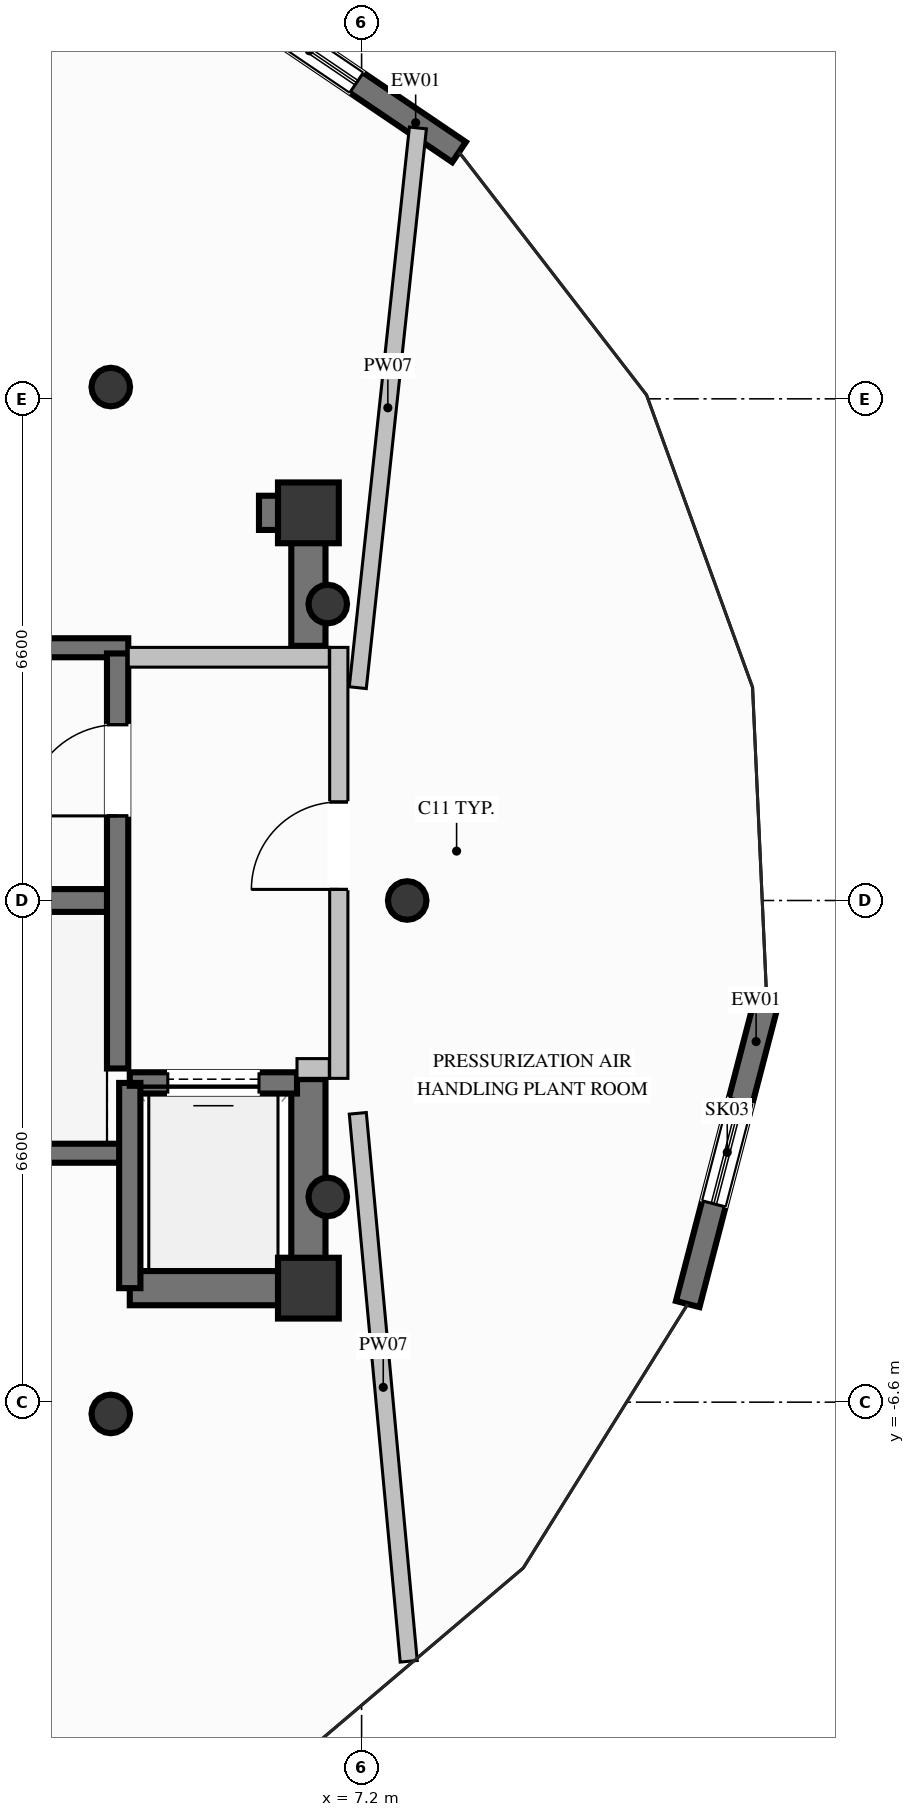
"""IFC4 building model, lengths in metres.
Left out: names, types, materials, properties, quantities, classifications, styles, units other than length and angle.
Written with IfcOpenShell. Run it as: python <this file> out.ifc"""

import sys

from ifc_helpers import new_model, si_unit, direction, frame, frame_2d, origin, origin_2d, place, context, subcontext, project, spatial, rectangle, hollow_circle, extrude, element, fill, save


model = new_model("IFC4")
c1 = context("Model", 3, precision=1e-05, world=origin(), true_north=direction((0.0, 1.0)))
c2 = subcontext(c1, "Body", "Model", "MODEL_VIEW")
j1 = project(units=[si_unit("LENGTHUNIT", "METRE"), si_unit("PLANEANGLEUNIT", "RADIAN")], contexts=[c1])
p1 = place(None, origin())
s1 = spatial("IfcSite", under=j1, at=p1, CompositionType="ELEMENT")
p2 = place(p1, origin())
s2 = spatial("IfcBuilding", under=s1, at=p2, CompositionType="ELEMENT")
p3 = place(p2, frame((0.0, 0.0, 308.2)))
s3 = spatial("IfcBuildingStorey", under=s2, at=p3, CompositionType="ELEMENT", Elevation=308.2)
for number, where, z_axis, x_axis in (
    (1, (6.5, -5.1, 0.0), (0.0, 0.0, 1.0), (1.0, 0.0, 0.0)),
    (2, (6.5, 5.1, 0.0), (0.0, 0.0, 1.0), (1.0, 0.0, 0.0)),
):
    element("IfcColumn", number, at=place(p3, frame(where, z_axis=z_axis, x_axis=x_axis)), inside=s3, PredefinedType="COLUMN", context=c2, shape_type="SweptSolid", body=[
        extrude(rectangle(XDim=0.8, YDim=0.8, at=origin_2d()), origin(), (0.0, 0.0, 1.0), 6.4),
    ])
p4 = place(p3, frame((-3.99, 0.0, 0.0), z_axis=(0.0, 0.0, 1.0), x_axis=(1.0, 0.0, 0.0)))
e3 = element("IfcWall", 3, at=p4, inside=s3, PredefinedType="SHEAR", context=c2, shape_type="SweptSolid", body=[
    extrude(rectangle(XDim=7.98, YDim=0.3, at=frame_2d((3.99, 0.0))), origin(), (0.0, 0.0, 1.0), 6.4),
])
for number, where, z_axis, x_axis in (
    (4, (-4.13, -3.325, 0.0), (0.0, 0.0, 1.0), (1.0, 0.0, 0.0)),
    (5, (-4.13, 3.325, 0.0), (0.0, 0.0, 1.0), (1.0, 0.0, 0.0)),
):
    element("IfcWall", number, at=place(p3, frame(where, z_axis=z_axis, x_axis=x_axis)), inside=s3, PredefinedType="SOLIDWALL", context=c2, shape_type="SweptSolid", body=[
        extrude(rectangle(XDim=8.26, YDim=0.25, at=frame_2d((4.13, 0.0))), origin(), (0.0, 0.0, 1.0), 6.4),
    ])
p5 = place(p3, frame((4.15, -5.1, 0.0), z_axis=(0.0, 0.0, 1.0), x_axis=(1.0, 0.0, 0.0)))
e6 = element("IfcWall", 6, at=p5, inside=s3, PredefinedType="SHEAR", context=c2, shape_type="SweptSolid", body=[
    extrude(rectangle(XDim=2.125, YDim=0.45, at=frame_2d((1.062, 0.0))), origin(), (0.0, 0.0, 1.0), 6.4),
])
p6 = place(p3, frame((5.85, 5.1, 0.0), z_axis=(0.0, 0.0, 1.0), x_axis=(1.0, 0.0, 0.0)))
e7 = element("IfcWall", 7, at=p6, inside=s3, PredefinedType="SHEAR", context=c2, shape_type="SweptSolid", body=[
    extrude(rectangle(XDim=0.425, YDim=0.45, at=frame_2d((0.212, 0.0))), origin(), (0.0, 0.0, 1.0), 6.4),
])
p7 = place(p3, frame((6.5, -5.325, 0.0), z_axis=(0.0, 0.0, 1.0), x_axis=(0.0, 1.0, 0.0)))
e8 = element("IfcWall", 8, at=p7, inside=s3, PredefinedType="SHEAR", context=c2, shape_type="SweptSolid", body=[
    extrude(rectangle(XDim=2.975, YDim=0.45, at=frame_2d((1.487, 0.0))), origin(), (0.0, 0.0, 1.0), 6.4),
])
p8 = place(p3, frame((6.5, 3.35, 0.0), z_axis=(0.0, 0.0, 1.0), x_axis=(0.0, 1.0, 0.0)))
e9 = element("IfcWall", 9, at=p8, inside=s3, PredefinedType="SHEAR", context=c2, shape_type="SweptSolid", body=[
    extrude(rectangle(XDim=1.975, YDim=0.45, at=frame_2d((0.987, 0.0))), origin(), (0.0, 0.0, 1.0), 6.4),
])
for number, where, z_axis, x_axis in (
    (10, (7.8, 0.0, 0.0), (0.0, 0.0, 1.0), (1.0, 0.0, 0.0)),
    (11, (6.755, 3.9, 0.0), (0.0, 0.0, 1.0), (1.0, 0.0, 0.0)),
    (12, (3.9, 6.755, 0.0), (0.0, 0.0, 1.0), (1.0, 0.0, 0.0)),
    (13, (3.9, -6.755, 0.0), (0.0, 0.0, 1.0), (1.0, 0.0, 0.0)),
    (14, (6.755, -3.9, 0.0), (0.0, 0.0, 1.0), (1.0, 0.0, 0.0)),
):
    element("IfcColumn", number, at=place(p3, frame(where, z_axis=z_axis, x_axis=x_axis)), inside=s3, PredefinedType="COLUMN", context=c2, shape_type="SweptSolid", body=[
        extrude(hollow_circle(Radius=0.254, WallThickness=0.02, at=origin_2d()), origin(), (0.0, 0.0, 1.0), 6.4),
    ])
p9 = place(p3, frame((12.531, -1.317, 0.0), z_axis=(0.0, 0.0, 1.0), x_axis=(-0.252103886341, -0.967700175928, 0.0)))
e15 = element("IfcWall", 15, at=p9, inside=s3, PredefinedType="SOLIDWALL", context=c2, shape_type="SweptSolid", body=[
    extrude(rectangle(XDim=4.125, YDim=0.32, at=frame_2d((2.063, 0.0))), origin(), (0.0, 0.0, 1.0), 6.12),
])
p10 = place(p9, frame((1.363, 0.0, 0.6)))
e16 = element("IfcOpeningElement", 16, at=p10, cuts=e15, PredefinedType="OPENING", context=c2, shape_type="SweptSolid", body=[
    extrude(rectangle(XDim=1.4, YDim=1.8, at=frame_2d((0.7, 0.9))), frame((0.0, 0.17, 0.0), z_axis=(0.0, -1.0, 0.0), x_axis=(1.0, 0.0, 0.0)), (0.0, 0.0, 1.0), 0.34),
])
p11 = place(p3, frame((5.185, 12.078, 0.0), z_axis=(0.0, 0.0, 1.0), x_axis=(0.828085822651, -0.560601347059, 0.0)))
e17 = element("IfcWall", 17, at=p11, inside=s3, PredefinedType="SOLIDWALL", context=c2, shape_type="SweptSolid", body=[
    extrude(rectangle(XDim=3.981, YDim=0.32, at=frame_2d((1.991, 0.0))), origin(), (0.0, 0.0, 1.0), 6.12),
])
p12 = place(p11, frame((0.853, 0.0, 1.1)))
e18 = element("IfcOpeningElement", 18, at=p12, cuts=e17, PredefinedType="OPENING", context=c2, shape_type="SweptSolid", body=[
    extrude(rectangle(XDim=1.5, YDim=1.2, at=frame_2d((0.75, 0.6))), frame((0.0, 0.17, 0.0), z_axis=(0.0, -1.0, 0.0), x_axis=(1.0, 0.0, 0.0)), (0.0, 0.0, 1.0), 0.34),
])
p13 = place(p3, frame((6.35, -2.4, 0.0), z_axis=(0.0, 0.0, 1.0), x_axis=(-1.0, 0.0, 0.0)))
e19 = element("IfcWall", 19, at=p13, inside=s3, PredefinedType="SOLIDWALL", context=c2, shape_type="SweptSolid", body=[
    extrude(rectangle(XDim=2.2, YDim=0.28, at=frame_2d((1.1, 0.0))), origin(), (0.0, 0.0, 1.0), 6.12),
])
p14 = place(p13, frame((0.5, 0.0, 0.0)))
e20 = element("IfcOpeningElement", 20, at=p14, cuts=e19, PredefinedType="OPENING", context=c2, shape_type="SweptSolid", body=[
    extrude(rectangle(XDim=1.2, YDim=2.2, at=frame_2d((0.6, 1.1))), frame((0.0, 0.15, 0.0), z_axis=(0.0, -1.0, 0.0), x_axis=(1.0, 0.0, 0.0)), (0.0, 0.0, 1.0), 0.3),
])
p15 = place(p3, frame((4.15, -2.4, 0.0), z_axis=(0.0, 0.0, 1.0), x_axis=(0.0, -1.0, 0.0)))
e21 = element("IfcWall", 21, at=p15, inside=s3, PredefinedType="SOLIDWALL", context=c2, shape_type="SweptSolid", body=[
    extrude(rectangle(XDim=2.7, YDim=0.28, at=frame_2d((1.35, 0.0))), origin(), (0.0, 0.0, 1.0), 6.12),
])
p16 = place(p3, frame((3.99, -2.21, 0.0), z_axis=(0.0, 0.0, 1.0), x_axis=(0.0, 1.0, 0.0)))
e22 = element("IfcWall", 22, at=p16, inside=s3, PredefinedType="SOLIDWALL", context=c2, shape_type="SweptSolid", body=[
    extrude(rectangle(XDim=5.46, YDim=0.28, at=frame_2d((2.73, 0.0))), origin(), (0.0, 0.0, 1.0), 6.12),
])
p17 = place(p16, frame((3.323, 0.0, 0.0)))
e23 = element("IfcOpeningElement", 23, at=p17, cuts=e22, PredefinedType="OPENING", context=c2, shape_type="SweptSolid", body=[
    extrude(rectangle(XDim=1.2, YDim=2.2, at=frame_2d((0.6, 1.1))), frame((0.0, 0.15, 0.0), z_axis=(0.0, -1.0, 0.0), x_axis=(1.0, 0.0, 0.0)), (0.0, 0.0, 1.0), 0.3),
])
p18 = place(p3, frame((6.9, -2.34, 0.0), z_axis=(0.0, 0.0, 1.0), x_axis=(0.0, 1.0, 0.0)))
e24 = element("IfcWall", 24, at=p18, inside=s3, PredefinedType="PARTITIONING", context=c2, shape_type="SweptSolid", body=[
    extrude(rectangle(XDim=5.67, YDim=0.24, at=frame_2d((2.835, 0.0))), origin(), (0.0, 0.0, 1.0), 5.005),
])
p19 = place(p18, frame((2.486, 0.0, 0.0)))
e25 = element("IfcOpeningElement", 25, at=p19, cuts=e24, PredefinedType="OPENING", context=c2, shape_type="SweptSolid", body=[
    extrude(rectangle(XDim=1.15, YDim=2.2, at=frame_2d((0.575, 1.1))), frame((0.0, 0.13, 0.0), z_axis=(0.0, -1.0, 0.0), x_axis=(1.0, 0.0, 0.0)), (0.0, 0.0, 1.0), 0.26),
])
p20 = place(p3, frame((6.35, -2.21, 0.0), z_axis=(0.0, 0.0, 1.0), x_axis=(1.0, 0.0, 0.0)))
e26 = element("IfcWall", 26, at=p20, inside=s3, PredefinedType="PARTITIONING", context=c2, shape_type="SweptSolid", body=[
    extrude(rectangle(XDim=0.425, YDim=0.26, at=frame_2d((0.212, 0.0))), origin(), (0.0, 0.0, 1.0), 6.12),
])
p21 = place(p3, frame((4.13, 3.2, 0.0), z_axis=(0.0, 0.0, 1.0), x_axis=(1.0, 0.0, 0.0)))
e27 = element("IfcWall", 27, at=p21, inside=s3, PredefinedType="PARTITIONING", context=c2, shape_type="SweptSolid", body=[
    extrude(rectangle(XDim=2.645, YDim=0.26, at=frame_2d((1.323, 0.0))), origin(), (0.0, 0.0, 1.0), 6.12),
])
p22 = place(p3, frame((7.15, 2.8, 0.0), z_axis=(0.0, 0.0, 1.0), x_axis=(0.106801982795, 0.994280310813, 0.0)))
e28 = element("IfcWall", 28, at=p22, inside=s3, PredefinedType="PARTITIONING", context=c2, shape_type="SweptSolid", body=[
    extrude(rectangle(XDim=7.406, YDim=0.225, at=frame_2d((3.703, 0.0))), origin(), (0.0, 0.0, 1.0), 5.005),
])
p23 = place(p3, frame((7.15, -2.8, 0.0), z_axis=(0.0, 0.0, 1.0), x_axis=(0.092563503102, -0.995706783091, 0.0)))
e29 = element("IfcWall", 29, at=p23, inside=s3, PredefinedType="PARTITIONING", context=c2, shape_type="SweptSolid", body=[
    extrude(rectangle(XDim=7.24, YDim=0.225, at=frame_2d((3.62, 0.0))), origin(), (0.0, 0.0, 1.0), 5.005),
])
p24 = place(p10, origin())
e30 = element("IfcWindow", 30, at=p24, inside=s3, PartitioningType="SINGLE_PANEL", PredefinedType="SKYLIGHT", context=c2, shape_type="SweptSolid", body=[
    extrude(rectangle(XDim=1.4, YDim=1.8, at=frame_2d((0.7, 0.9))), frame((0.0, 0.03, 0.0), z_axis=(0.0, -1.0, 0.0), x_axis=(1.0, 0.0, 0.0)), (0.0, 0.0, 1.0), 0.06),
])
fill(e16, e30)
p25 = place(p12, origin())
e31 = element("IfcWindow", 31, at=p25, inside=s3, PartitioningType="SINGLE_PANEL", PredefinedType="WINDOW", context=c2, shape_type="SweptSolid", body=[
    extrude(rectangle(XDim=1.5, YDim=1.2, at=frame_2d((0.75, 0.6))), frame((0.0, 0.03, 0.0), z_axis=(0.0, -1.0, 0.0), x_axis=(1.0, 0.0, 0.0)), (0.0, 0.0, 1.0), 0.06),
])
fill(e18, e31)
p26 = place(p14, origin())
e32 = element("IfcDoor", 32, at=p26, inside=s3, OperationType="SLIDING_TO_LEFT", PredefinedType="DOOR", context=c2, shape_type="SweptSolid", body=[
    extrude(rectangle(XDim=1.2, YDim=2.2, at=frame_2d((0.6, 1.1))), frame((0.0, 0.025, 0.0), z_axis=(0.0, -1.0, 0.0), x_axis=(1.0, 0.0, 0.0)), (0.0, 0.0, 1.0), 0.05),
])
fill(e20, e32)
p27 = place(p17, origin())
e33 = element("IfcDoor", 33, at=p27, inside=s3, OperationType="SINGLE_SWING_LEFT", PredefinedType="DOOR", context=c2, shape_type="SweptSolid", body=[
    extrude(rectangle(XDim=1.2, YDim=2.2, at=frame_2d((0.6, 1.1))), frame((0.0, 0.025, 0.0), z_axis=(0.0, -1.0, 0.0), x_axis=(1.0, 0.0, 0.0)), (0.0, 0.0, 1.0), 0.05),
])
fill(e23, e33)
p28 = place(p19, origin())
e34 = element("IfcDoor", 34, at=p28, inside=s3, OperationType="SINGLE_SWING_LEFT", PredefinedType="DOOR", context=c2, shape_type="SweptSolid", body=[
    extrude(rectangle(XDim=1.15, YDim=2.2, at=frame_2d((0.575, 1.1))), frame((0.0, 0.025, 0.0), z_axis=(0.0, -1.0, 0.0), x_axis=(1.0, 0.0, 0.0)), (0.0, 0.0, 1.0), 0.05),
])
fill(e25, e34)
save(model, sys.argv[1])
